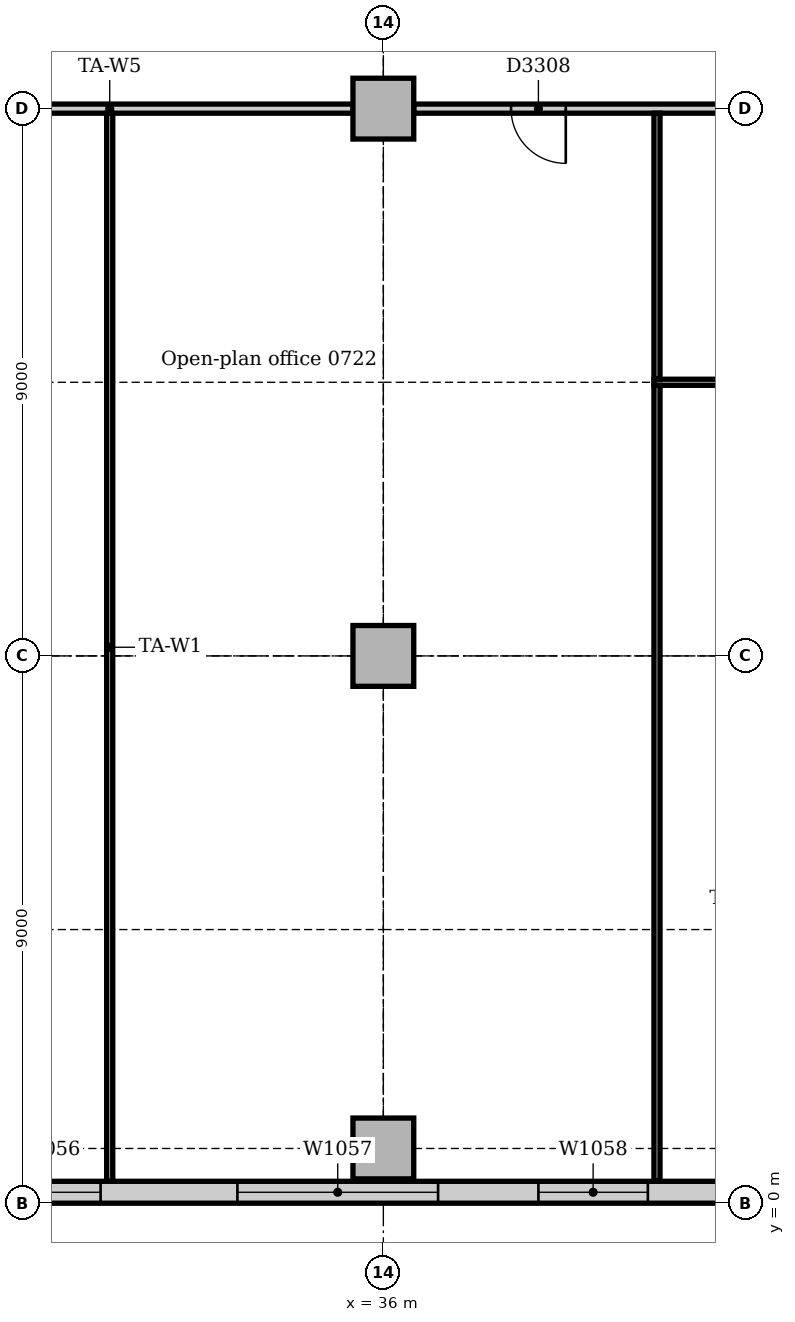
"""IFC4 building model, lengths in metres.
Left out: names, types, materials, properties, quantities, classifications, styles, units other than length and angle.
Written with IfcOpenShell. Run it as: python <this file> out.ifc"""

import sys

from ifc_helpers import new_model, si_unit, direction, frame, frame_2d, origin, origin_2d, place, context, subcontext, project, spatial, rectangle, extrude, element, fill, save


model = new_model("IFC4")
c1 = context("Model", 3, precision=1e-05, world=origin(), true_north=direction((0.0, 1.0)))
c2 = subcontext(c1, "Body", "Model", "MODEL_VIEW")
j1 = project(units=[si_unit("LENGTHUNIT", "METRE"), si_unit("PLANEANGLEUNIT", "RADIAN")], contexts=[c1])
p1 = place(None, origin())
s1 = spatial("IfcSite", under=j1, at=p1, CompositionType="ELEMENT")
p2 = place(p1, origin())
s2 = spatial("IfcBuilding", under=s1, at=p2, CompositionType="ELEMENT")
p3 = place(p2, frame((0.0, 0.0, 34.0)))
s3 = spatial("IfcBuildingStorey", under=s2, at=p3, CompositionType="ELEMENT", Elevation=34.0)
for number, where, z_axis, x_axis in (
    (1, (36.0, 0.9, 0.0), (0.0, 0.0, 1.0), (1.0, 0.0, 0.0)),
    (2, (36.0, 9.0, 0.0), (0.0, 0.0, 1.0), (1.0, 0.0, 0.0)),
    (3, (36.0, 18.0, 0.0), (0.0, 0.0, 1.0), (1.0, 0.0, 0.0)),
):
    element("IfcColumn", number, at=place(p3, frame(where, z_axis=z_axis, x_axis=x_axis)), inside=s3, PredefinedType="COLUMN", context=c2, shape_type="SweptSolid", body=[
        extrude(rectangle(XDim=1.0, YDim=1.0, at=origin_2d()), origin(), (0.0, 0.0, 1.0), 3.85),
    ])
p4 = place(p3, frame((4.243, 0.18, 0.0), z_axis=(0.0, 0.0, 1.0), x_axis=(1.0, 0.0, 0.0)))
e4 = element("IfcWall", 4, at=p4, inside=s3, PredefinedType="STANDARD", context=c2, shape_type="SweptSolid", body=[
    extrude(rectangle(XDim=44.015, YDim=0.36, at=frame_2d((22.007, 0.0))), origin(), (0.0, 0.0, 1.0), 3.85),
])
p5 = place(p4, frame((2.357, 0.0, 0.9)))
e5 = element("IfcOpeningElement", 5, at=p5, cuts=e4, PredefinedType="OPENING", context=c2, shape_type="SweptSolid", body=[
    extrude(rectangle(XDim=3.3, YDim=1.6, at=frame_2d((1.65, 0.8))), frame((0.0, 0.19, 0.0), z_axis=(0.0, -1.0, 0.0), x_axis=(1.0, 0.0, 0.0)), (0.0, 0.0, 1.0), 0.38),
])
p6 = place(p4, frame((7.307, 0.0, 0.9)))
e6 = element("IfcOpeningElement", 6, at=p6, cuts=e4, PredefinedType="OPENING", context=c2, shape_type="SweptSolid", body=[
    extrude(rectangle(XDim=1.8, YDim=1.6, at=frame_2d((0.9, 0.8))), frame((0.0, 0.19, 0.0), z_axis=(0.0, -1.0, 0.0), x_axis=(1.0, 0.0, 0.0)), (0.0, 0.0, 1.0), 0.38),
])
p7 = place(p4, frame((11.357, 0.0, 0.9)))
e7 = element("IfcOpeningElement", 7, at=p7, cuts=e4, PredefinedType="OPENING", context=c2, shape_type="SweptSolid", body=[
    extrude(rectangle(XDim=3.3, YDim=1.6, at=frame_2d((1.65, 0.8))), frame((0.0, 0.19, 0.0), z_axis=(0.0, -1.0, 0.0), x_axis=(1.0, 0.0, 0.0)), (0.0, 0.0, 1.0), 0.38),
])
p8 = place(p4, frame((15.857, 0.0, 0.9)))
e8 = element("IfcOpeningElement", 8, at=p8, cuts=e4, PredefinedType="OPENING", context=c2, shape_type="SweptSolid", body=[
    extrude(rectangle(XDim=3.3, YDim=1.6, at=frame_2d((1.65, 0.8))), frame((0.0, 0.19, 0.0), z_axis=(0.0, -1.0, 0.0), x_axis=(1.0, 0.0, 0.0)), (0.0, 0.0, 1.0), 0.38),
])
p9 = place(p4, frame((20.357, 0.0, 0.9)))
e9 = element("IfcOpeningElement", 9, at=p9, cuts=e4, PredefinedType="OPENING", context=c2, shape_type="SweptSolid", body=[
    extrude(rectangle(XDim=3.3, YDim=1.6, at=frame_2d((1.65, 0.8))), frame((0.0, 0.19, 0.0), z_axis=(0.0, -1.0, 0.0), x_axis=(1.0, 0.0, 0.0)), (0.0, 0.0, 1.0), 0.38),
])
p10 = place(p4, frame((25.307, 0.0, 0.9)))
e10 = element("IfcOpeningElement", 10, at=p10, cuts=e4, PredefinedType="OPENING", context=c2, shape_type="SweptSolid", body=[
    extrude(rectangle(XDim=1.8, YDim=1.6, at=frame_2d((0.9, 0.8))), frame((0.0, 0.19, 0.0), z_axis=(0.0, -1.0, 0.0), x_axis=(1.0, 0.0, 0.0)), (0.0, 0.0, 1.0), 0.38),
])
p11 = place(p4, frame((29.357, 0.0, 0.9)))
e11 = element("IfcOpeningElement", 11, at=p11, cuts=e4, PredefinedType="OPENING", context=c2, shape_type="SweptSolid", body=[
    extrude(rectangle(XDim=3.3, YDim=1.6, at=frame_2d((1.65, 0.8))), frame((0.0, 0.19, 0.0), z_axis=(0.0, -1.0, 0.0), x_axis=(1.0, 0.0, 0.0)), (0.0, 0.0, 1.0), 0.38),
])
p12 = place(p4, frame((34.307, 0.0, 0.9)))
e12 = element("IfcOpeningElement", 12, at=p12, cuts=e4, PredefinedType="OPENING", context=c2, shape_type="SweptSolid", body=[
    extrude(rectangle(XDim=1.8, YDim=1.6, at=frame_2d((0.9, 0.8))), frame((0.0, 0.19, 0.0), z_axis=(0.0, -1.0, 0.0), x_axis=(1.0, 0.0, 0.0)), (0.0, 0.0, 1.0), 0.38),
])
p13 = place(p4, frame((38.357, 0.0, 0.9)))
e13 = element("IfcOpeningElement", 13, at=p13, cuts=e4, PredefinedType="OPENING", context=c2, shape_type="SweptSolid", body=[
    extrude(rectangle(XDim=3.3, YDim=1.6, at=frame_2d((1.65, 0.8))), frame((0.0, 0.19, 0.0), z_axis=(0.0, -1.0, 0.0), x_axis=(1.0, 0.0, 0.0)), (0.0, 0.0, 1.0), 0.38),
])
p14 = place(p3, frame((36.5, 18.0, 0.0), z_axis=(0.0, 0.0, 1.0), x_axis=(1.0, 0.0, 0.0)))
e14 = element("IfcWall", 14, at=p14, inside=s3, PredefinedType="PARTITIONING", context=c2, shape_type="SweptSolid", body=[
    extrude(rectangle(XDim=8.0, YDim=0.15, at=frame_2d((4.0, 0.0))), origin(), (0.0, 0.0, 1.0), 3.15),
])
p15 = place(p14, frame((1.6, 0.0, 0.0)))
e15 = element("IfcOpeningElement", 15, at=p15, cuts=e14, PredefinedType="OPENING", context=c2, shape_type="SweptSolid", body=[
    extrude(rectangle(XDim=0.9, YDim=2.1, at=frame_2d((0.45, 1.05))), frame((0.0, 0.085, 0.0), z_axis=(0.0, -1.0, 0.0), x_axis=(1.0, 0.0, 0.0)), (0.0, 0.0, 1.0), 0.17),
])
p16 = place(p3, frame((27.5, 18.0, 0.0), z_axis=(0.0, 0.0, 1.0), x_axis=(1.0, 0.0, 0.0)))
e16 = element("IfcWall", 16, at=p16, inside=s3, PredefinedType="PARTITIONING", context=c2, shape_type="SweptSolid", body=[
    extrude(rectangle(XDim=8.0, YDim=0.15, at=frame_2d((4.0, 0.0))), origin(), (0.0, 0.0, 1.0), 3.15),
])
p17 = place(p3, frame((40.45, 13.5, 0.0), z_axis=(0.0, 0.0, 1.0), x_axis=(1.0, 0.0, 0.0)))
e17 = element("IfcWall", 17, at=p17, inside=s3, PredefinedType="PARTITIONING", context=c2, shape_type="SweptSolid", body=[
    extrude(rectangle(XDim=8.975, YDim=0.1, at=frame_2d((4.487, 0.0))), origin(), (0.0, 0.0, 1.0), 3.35),
])
p18 = place(p17, frame((1.9, 0.0, 0.0)))
e18 = element("IfcOpeningElement", 18, at=p18, cuts=e17, PredefinedType="OPENING", context=c2, shape_type="SweptSolid", body=[
    extrude(rectangle(XDim=0.9, YDim=2.1, at=frame_2d((0.45, 1.05))), frame((0.0, 0.06, 0.0), z_axis=(0.0, -1.0, 0.0), x_axis=(1.0, 0.0, 0.0)), (0.0, 0.0, 1.0), 0.12),
])
p19 = place(p17, frame((6.25, 0.0, 0.0)))
e19 = element("IfcOpeningElement", 19, at=p19, cuts=e17, PredefinedType="OPENING", context=c2, shape_type="SweptSolid", body=[
    extrude(rectangle(XDim=0.9, YDim=2.1, at=frame_2d((0.45, 1.05))), frame((0.0, 0.06, 0.0), z_axis=(0.0, -1.0, 0.0), x_axis=(1.0, 0.0, 0.0)), (0.0, 0.0, 1.0), 0.12),
])
p20 = place(p3, frame((31.5, 0.36, 0.0), z_axis=(0.0, 0.0, 1.0), x_axis=(0.0, 1.0, 0.0)))
e20 = element("IfcWall", 20, at=p20, inside=s3, PredefinedType="PARTITIONING", context=c2, shape_type="SweptSolid", body=[
    extrude(rectangle(XDim=17.565, YDim=0.1, at=frame_2d((8.783, 0.0))), origin(), (0.0, 0.0, 1.0), 3.85),
])
p21 = place(p3, frame((40.5, 13.55, 0.0), z_axis=(0.0, 0.0, 1.0), x_axis=(0.0, 1.0, 0.0)))
e21 = element("IfcWall", 21, at=p21, inside=s3, PredefinedType="PARTITIONING", context=c2, shape_type="SweptSolid", body=[
    extrude(rectangle(XDim=4.375, YDim=0.1, at=frame_2d((2.188, 0.0))), origin(), (0.0, 0.0, 1.0), 3.85),
])
p22 = place(p3, frame((40.5, 0.36, 0.0), z_axis=(0.0, 0.0, 1.0), x_axis=(0.0, 1.0, 0.0)))
e22 = element("IfcWall", 22, at=p22, inside=s3, PredefinedType="PARTITIONING", context=c2, shape_type="SweptSolid", body=[
    extrude(rectangle(XDim=13.09, YDim=0.1, at=frame_2d((6.545, 0.0))), origin(), (0.0, 0.0, 1.0), 3.85),
])
p23 = place(p10, origin())
e23 = element("IfcWindow", 23, at=p23, inside=s3, PartitioningType="SINGLE_PANEL", PredefinedType="WINDOW", context=c2, shape_type="SweptSolid", body=[
    extrude(rectangle(XDim=1.8, YDim=1.6, at=frame_2d((0.9, 0.8))), frame((0.0, 0.13, 0.0), z_axis=(0.0, -1.0, 0.0), x_axis=(1.0, 0.0, 0.0)), (0.0, 0.0, 1.0), 0.06),
])
fill(e10, e23)
p24 = place(p11, origin())
e24 = element("IfcWindow", 24, at=p24, inside=s3, PartitioningType="SINGLE_PANEL", PredefinedType="WINDOW", context=c2, shape_type="SweptSolid", body=[
    extrude(rectangle(XDim=3.3, YDim=1.6, at=frame_2d((1.65, 0.8))), frame((0.0, 0.13, 0.0), z_axis=(0.0, -1.0, 0.0), x_axis=(1.0, 0.0, 0.0)), (0.0, 0.0, 1.0), 0.06),
])
fill(e11, e24)
p25 = place(p12, origin())
e25 = element("IfcWindow", 25, at=p25, inside=s3, PartitioningType="SINGLE_PANEL", PredefinedType="WINDOW", context=c2, shape_type="SweptSolid", body=[
    extrude(rectangle(XDim=1.8, YDim=1.6, at=frame_2d((0.9, 0.8))), frame((0.0, 0.13, 0.0), z_axis=(0.0, -1.0, 0.0), x_axis=(1.0, 0.0, 0.0)), (0.0, 0.0, 1.0), 0.06),
])
fill(e12, e25)
p26 = place(p15, frame((0.9, 0.0, 0.0), z_axis=(0.0, 0.0, 1.0), x_axis=(-1.0, 0.0, 0.0)))
e26 = element("IfcDoor", 26, at=p26, inside=s3, OperationType="SINGLE_SWING_LEFT", PredefinedType="DOOR", context=c2, shape_type="SweptSolid", body=[
    extrude(rectangle(XDim=0.9, YDim=2.1, at=frame_2d((0.45, 1.05))), frame((0.0, 0.025, 0.0), z_axis=(0.0, -1.0, 0.0), x_axis=(1.0, 0.0, 0.0)), (0.0, 0.0, 1.0), 0.05),
])
fill(e15, e26)
save(model, sys.argv[1])
